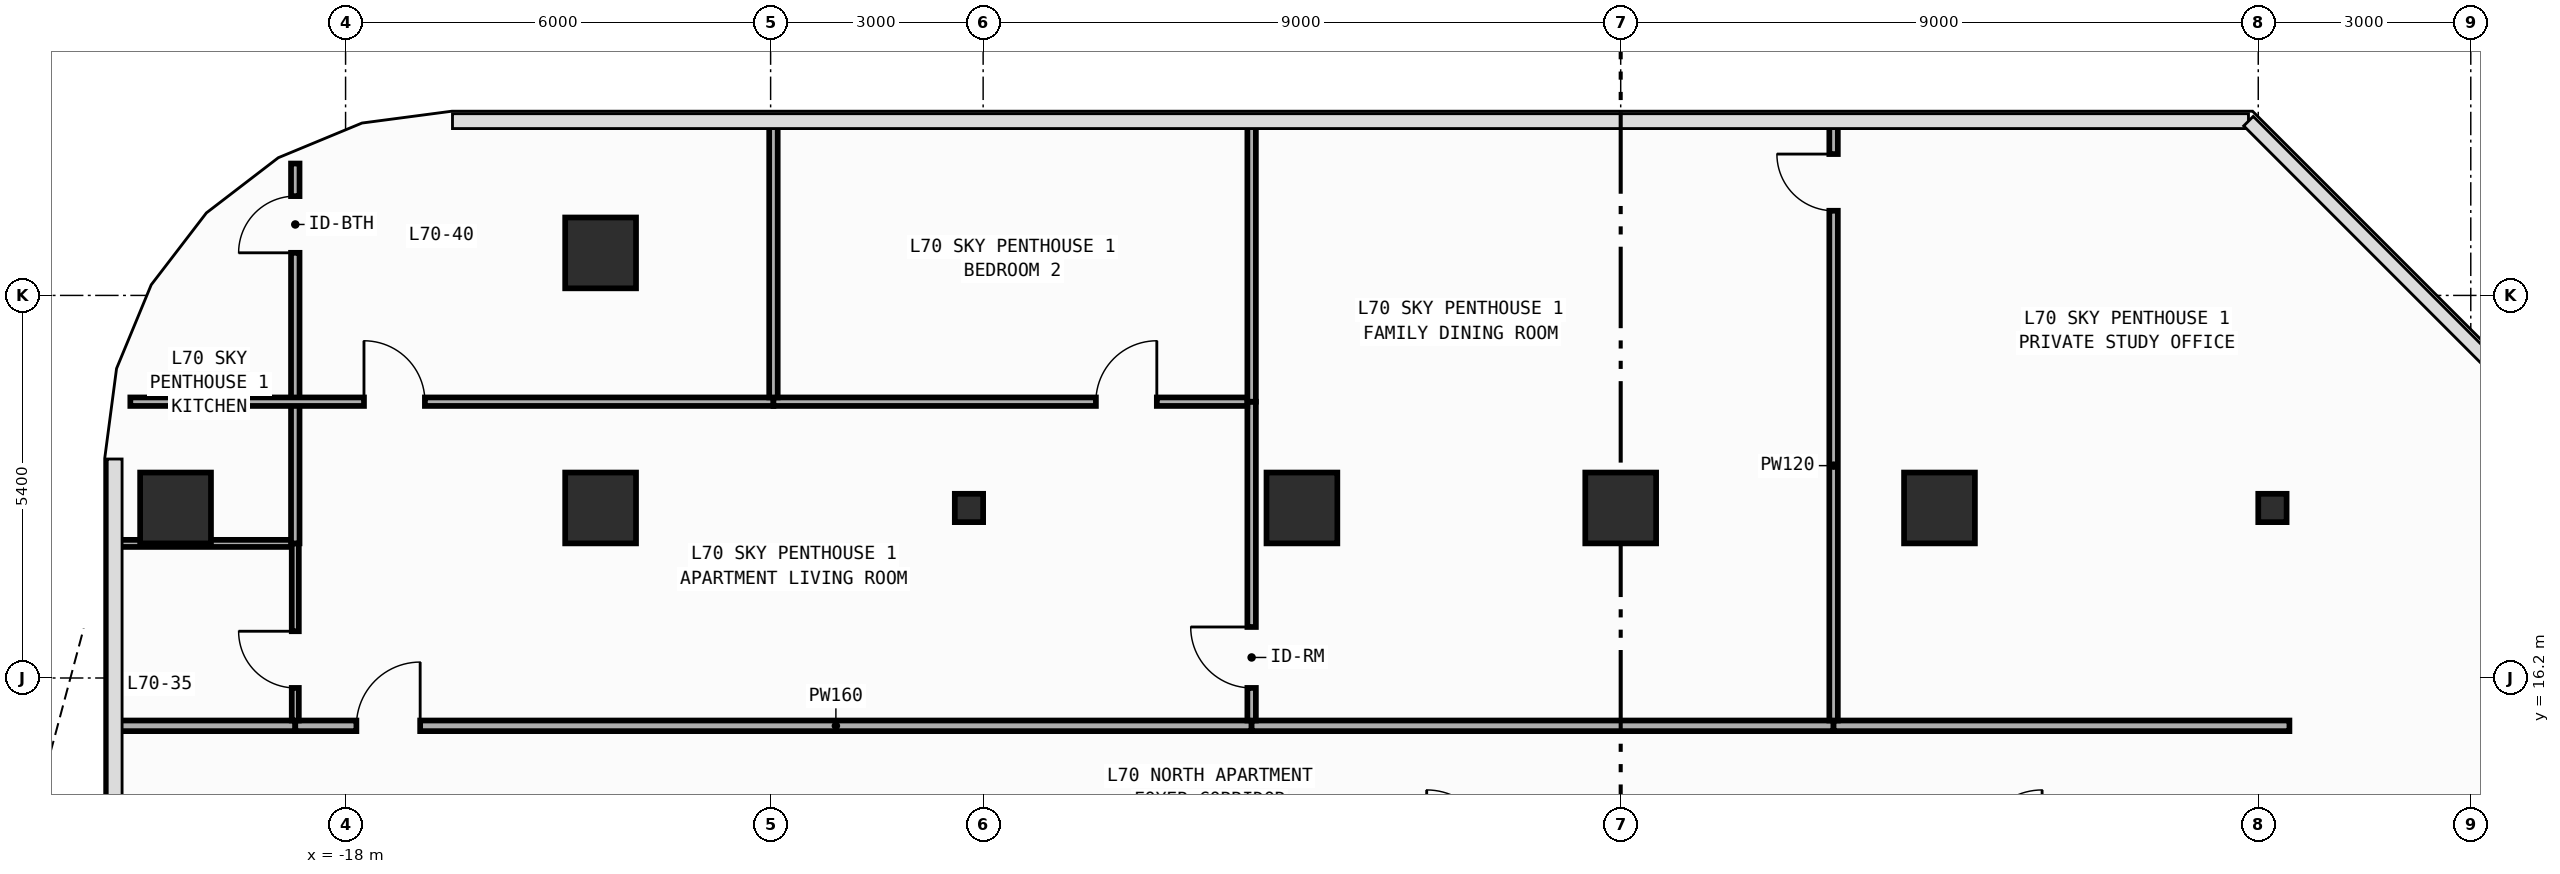
"""IFC4 building model, lengths in metres.
Left out: names, types, materials, properties, quantities, classifications, styles, units other than length and angle.
Written with IfcOpenShell. Run it as: python <this file> out.ifc"""

import sys

from ifc_helpers import new_model, si_unit, direction, frame, frame_2d, origin, origin_2d, place, context, subcontext, project, spatial, rectangle, circle, i_section, extrude, element, fill, save


model = new_model("IFC4")
c1 = context("Model", 3, precision=1e-05, world=origin(), true_north=direction((0.0, 1.0)))
c2 = subcontext(c1, "Body", "Model", "MODEL_VIEW")
j1 = project(units=[si_unit("LENGTHUNIT", "METRE"), si_unit("PLANEANGLEUNIT", "RADIAN")], contexts=[c1])
p1 = place(None, origin())
s1 = spatial("IfcSite", under=j1, at=p1, CompositionType="ELEMENT")
p2 = place(p1, origin())
s2 = spatial("IfcBuilding", under=s1, at=p2, CompositionType="ELEMENT")
p3 = place(p2, frame((0.0, 0.0, 292.8)))
s3 = spatial("IfcBuildingStorey", under=s2, at=p3, CompositionType="ELEMENT", Elevation=292.8)
for number, where, z_axis, x_axis in (
    (1, (-9.2, 18.6, 0.0), (0.0, 0.0, 1.0), (1.0, 0.0, 0.0)),
    (2, (9.2, 18.6, 0.0), (0.0, 0.0, 1.0), (1.0, 0.0, 0.0)),
):
    element("IfcColumn", number, at=place(p3, frame(where, z_axis=z_axis, x_axis=x_axis)), inside=s3, PredefinedType="COLUMN", context=c2, shape_type="SweptSolid", body=[
        extrude(i_section(OverallWidth=0.4, OverallDepth=0.4, WebThickness=0.013, FlangeThickness=0.021, FilletRadius=0.022, at=origin_2d()), origin(), (0.0, 0.0, 1.0), 3.8),
    ])
for number, where, z_axis, x_axis in (
    (3, (-20.4, 18.6, 0.0), (0.0, 0.0, 1.0), (1.0, 0.0, 0.0)),
    (4, (-14.4, 18.6, 0.0), (0.0, 0.0, 1.0), (1.0, 0.0, 0.0)),
    (5, (-4.5, 18.6, 0.0), (0.0, 0.0, 1.0), (1.0, 0.0, 0.0)),
    (6, (0.0, 18.6, 0.0), (0.0, 0.0, 1.0), (1.0, 0.0, 0.0)),
    (7, (4.5, 18.6, 0.0), (0.0, 0.0, 1.0), (1.0, 0.0, 0.0)),
    (8, (-14.4, 22.2, 0.0), (0.0, 0.0, 1.0), (1.0, 0.0, 0.0)),
):
    element("IfcColumn", number, at=place(p3, frame(where, z_axis=z_axis, x_axis=x_axis)), inside=s3, PredefinedType="COLUMN", context=c2, shape_type="SweptSolid", body=[
        extrude(circle(Radius=0.5, at=origin_2d()), origin(), (0.0, 0.0, 1.0), 3.8),
    ])
p4 = place(p3, frame((-21.255, 15.525, 0.0), z_axis=(0.0, 0.0, 1.0), x_axis=(1.0, 0.0, 0.0)))
e9 = element("IfcWall", 9, at=p4, inside=s3, PredefinedType="PARTITIONING", context=c2, shape_type="SweptSolid", body=[
    extrude(rectangle(XDim=2.545, YDim=0.15, at=frame_2d((1.272, 0.0))), origin(), (0.0, 0.0, 1.0), 3.54),
])
p5 = place(p3, frame((-18.71, 15.525, 0.0), z_axis=(0.0, 0.0, 1.0), x_axis=(1.0, 0.0, 0.0)))
e10 = element("IfcWall", 10, at=p5, inside=s3, PredefinedType="PARTITIONING", context=c2, shape_type="SweptSolid", body=[
    extrude(rectangle(XDim=13.5, YDim=0.15, at=frame_2d((6.75, 0.0))), origin(), (0.0, 0.0, 1.0), 3.54),
])
p6 = place(p5, frame((0.863, 0.0, 0.0)))
e11 = element("IfcOpeningElement", 11, at=p6, cuts=e10, PredefinedType="OPENING", context=c2, shape_type="SweptSolid", body=[
    extrude(rectangle(XDim=0.9, YDim=2.15, at=frame_2d((0.45, 1.075))), frame((0.0, 0.085, 0.0), z_axis=(0.0, -1.0, 0.0), x_axis=(1.0, 0.0, 0.0)), (0.0, 0.0, 1.0), 0.17),
])
p7 = place(p3, frame((-5.21, 15.525, 0.0), z_axis=(0.0, 0.0, 1.0), x_axis=(1.0, 0.0, 0.0)))
e12 = element("IfcWall", 12, at=p7, inside=s3, PredefinedType="PARTITIONING", context=c2, shape_type="SweptSolid", body=[
    extrude(rectangle(XDim=8.215, YDim=0.15, at=frame_2d((4.107, 0.0))), origin(), (0.0, 0.0, 1.0), 3.54),
])
p8 = place(p3, frame((3.005, 15.525, 0.0), z_axis=(0.0, 0.0, 1.0), x_axis=(1.0, 0.0, 0.0)))
e13 = element("IfcWall", 13, at=p8, inside=s3, PredefinedType="PARTITIONING", context=c2, shape_type="SweptSolid", body=[
    extrude(rectangle(XDim=6.435, YDim=0.15, at=frame_2d((3.218, 0.0))), origin(), (0.0, 0.0, 1.0), 3.54),
])
p9 = place(p3, frame((-21.255, 18.1, 0.0), z_axis=(0.0, 0.0, 1.0), x_axis=(1.0, 0.0, 0.0)))
e14 = element("IfcWall", 14, at=p9, inside=s3, PredefinedType="PARTITIONING", context=c2, shape_type="SweptSolid", body=[
    extrude(rectangle(XDim=2.495, YDim=0.1, at=frame_2d((1.248, 0.0))), origin(), (0.0, 0.0, 1.0), 3.54),
])
p10 = place(p3, frame((-18.71, 15.6, 0.0), z_axis=(0.0, 0.0, 1.0), x_axis=(0.0, 1.0, 0.0)))
e15 = element("IfcWall", 15, at=p10, inside=s3, PredefinedType="PARTITIONING", context=c2, shape_type="SweptSolid", body=[
    extrude(rectangle(XDim=2.5, YDim=0.1, at=frame_2d((1.25, 0.0))), origin(), (0.0, 0.0, 1.0), 3.54),
])
p11 = place(p10, frame((0.46, 0.0, 0.0)))
e16 = element("IfcOpeningElement", 16, at=p11, cuts=e15, PredefinedType="OPENING", context=c2, shape_type="SweptSolid", body=[
    extrude(rectangle(XDim=0.8, YDim=2.1, at=frame_2d((0.4, 1.05))), frame((0.0, 0.06, 0.0), z_axis=(0.0, -1.0, 0.0), x_axis=(1.0, 0.0, 0.0)), (0.0, 0.0, 1.0), 0.12),
])
p12 = place(p3, frame((-18.71, 18.1, 0.0), z_axis=(0.0, 0.0, 1.0), x_axis=(0.0, 1.0, 0.0)))
e17 = element("IfcWall", 17, at=p12, inside=s3, PredefinedType="PARTITIONING", context=c2, shape_type="SweptSolid", body=[
    extrude(rectangle(XDim=2.0, YDim=0.12, at=frame_2d((1.0, 0.0))), origin(), (0.0, 0.0, 1.0), 3.54),
])
p13 = place(p3, frame((-18.71, 20.1, 0.0), z_axis=(0.0, 0.0, 1.0), x_axis=(0.0, 1.0, 0.0)))
e18 = element("IfcWall", 18, at=p13, inside=s3, PredefinedType="PARTITIONING", context=c2, shape_type="SweptSolid", body=[
    extrude(rectangle(XDim=3.361, YDim=0.12, at=frame_2d((1.681, 0.0))), origin(), (0.0, 0.0, 1.0), 3.54),
])
p14 = place(p13, frame((2.102, 0.0, 0.0)))
e19 = element("IfcOpeningElement", 19, at=p14, cuts=e18, PredefinedType="OPENING", context=c2, shape_type="SweptSolid", body=[
    extrude(rectangle(XDim=0.8, YDim=2.1, at=frame_2d((0.4, 1.05))), frame((0.0, 0.07, 0.0), z_axis=(0.0, -1.0, 0.0), x_axis=(1.0, 0.0, 0.0)), (0.0, 0.0, 1.0), 0.14),
])
p15 = place(p3, frame((-5.21, 15.6, 0.0), z_axis=(0.0, 0.0, 1.0), x_axis=(0.0, 1.0, 0.0)))
e20 = element("IfcWall", 20, at=p15, inside=s3, PredefinedType="PARTITIONING", context=c2, shape_type="SweptSolid", body=[
    extrude(rectangle(XDim=4.5, YDim=0.12, at=frame_2d((2.25, 0.0))), origin(), (0.0, 0.0, 1.0), 3.54),
])
p16 = place(p15, frame((0.46, 0.0, 0.0)))
e21 = element("IfcOpeningElement", 21, at=p16, cuts=e20, PredefinedType="OPENING", context=c2, shape_type="SweptSolid", body=[
    extrude(rectangle(XDim=0.86, YDim=2.15, at=frame_2d((0.43, 1.075))), frame((0.0, 0.07, 0.0), z_axis=(0.0, -1.0, 0.0), x_axis=(1.0, 0.0, 0.0)), (0.0, 0.0, 1.0), 0.14),
])
p17 = place(p3, frame((-21.039, 20.1, 0.0), z_axis=(0.0, 0.0, 1.0), x_axis=(1.0, 0.0, 0.0)))
e22 = element("IfcWall", 22, at=p17, inside=s3, PredefinedType="PARTITIONING", context=c2, shape_type="SweptSolid", body=[
    extrude(rectangle(XDim=9.079, YDim=0.12, at=frame_2d((4.539, 0.0))), origin(), (0.0, 0.0, 1.0), 3.54),
])
p18 = place(p17, frame((3.298, 0.0, 0.0)))
e23 = element("IfcOpeningElement", 23, at=p18, cuts=e22, PredefinedType="OPENING", context=c2, shape_type="SweptSolid", body=[
    extrude(rectangle(XDim=0.86, YDim=2.15, at=frame_2d((0.43, 1.075))), frame((0.0, 0.07, 0.0), z_axis=(0.0, -1.0, 0.0), x_axis=(1.0, 0.0, 0.0)), (0.0, 0.0, 1.0), 0.14),
])
p19 = place(p3, frame((-11.96, 20.1, 0.0), z_axis=(0.0, 0.0, 1.0), x_axis=(1.0, 0.0, 0.0)))
e24 = element("IfcWall", 24, at=p19, inside=s3, PredefinedType="PARTITIONING", context=c2, shape_type="SweptSolid", body=[
    extrude(rectangle(XDim=6.69, YDim=0.12, at=frame_2d((3.345, 0.0))), origin(), (0.0, 0.0, 1.0), 3.54),
])
p20 = place(p19, frame((4.552, 0.0, 0.0)))
e25 = element("IfcOpeningElement", 25, at=p20, cuts=e24, PredefinedType="OPENING", context=c2, shape_type="SweptSolid", body=[
    extrude(rectangle(XDim=0.86, YDim=2.15, at=frame_2d((0.43, 1.075))), frame((0.0, 0.07, 0.0), z_axis=(0.0, -1.0, 0.0), x_axis=(1.0, 0.0, 0.0)), (0.0, 0.0, 1.0), 0.14),
])
p21 = place(p3, frame((3.005, 15.6, 0.0), z_axis=(0.0, 0.0, 1.0), x_axis=(0.0, 1.0, 0.0)))
e26 = element("IfcWall", 26, at=p21, inside=s3, PredefinedType="PARTITIONING", context=c2, shape_type="SweptSolid", body=[
    extrude(rectangle(XDim=8.455, YDim=0.12, at=frame_2d((4.228, 0.0))), origin(), (0.0, 0.0, 1.0), 3.54),
])
p22 = place(p21, frame((7.195, 0.0, 0.0)))
e27 = element("IfcOpeningElement", 27, at=p22, cuts=e26, PredefinedType="OPENING", context=c2, shape_type="SweptSolid", body=[
    extrude(rectangle(XDim=0.8, YDim=2.1, at=frame_2d((0.4, 1.05))), frame((0.0, 0.07, 0.0), z_axis=(0.0, -1.0, 0.0), x_axis=(1.0, 0.0, 0.0)), (0.0, 0.0, 1.0), 0.14),
])
p23 = place(p3, frame((-5.21, 20.1, 0.0), z_axis=(0.0, 0.0, 1.0), x_axis=(0.0, 1.0, 0.0)))
e28 = element("IfcWall", 28, at=p23, inside=s3, PredefinedType="PARTITIONING", context=c2, shape_type="SweptSolid", body=[
    extrude(rectangle(XDim=3.955, YDim=0.12, at=frame_2d((1.978, 0.0))), origin(), (0.0, 0.0, 1.0), 3.54),
])
p24 = place(p3, frame((-11.96, 20.16, 0.0), z_axis=(0.0, 0.0, 1.0), x_axis=(0.0, 1.0, 0.0)))
e29 = element("IfcWall", 29, at=p24, inside=s3, PredefinedType="PARTITIONING", context=c2, shape_type="SweptSolid", body=[
    extrude(rectangle(XDim=3.895, YDim=0.12, at=frame_2d((1.948, 0.0))), origin(), (0.0, 0.0, 1.0), 3.54),
])
p25 = place(p6, origin())
e30 = element("IfcDoor", 30, at=p25, inside=s3, OperationType="SINGLE_SWING_RIGHT", PredefinedType="DOOR", context=c2, shape_type="SweptSolid", body=[
    extrude(rectangle(XDim=0.9, YDim=2.15, at=frame_2d((0.45, 1.075))), frame((0.0, 0.025, 0.0), z_axis=(0.0, -1.0, 0.0), x_axis=(1.0, 0.0, 0.0)), (0.0, 0.0, 1.0), 0.05),
])
fill(e11, e30)
p26 = place(p11, origin())
e31 = element("IfcDoor", 31, at=p26, inside=s3, OperationType="SINGLE_SWING_RIGHT", PredefinedType="DOOR", context=c2, shape_type="SweptSolid", body=[
    extrude(rectangle(XDim=0.8, YDim=2.1, at=frame_2d((0.4, 1.05))), frame((0.0, 0.025, 0.0), z_axis=(0.0, -1.0, 0.0), x_axis=(1.0, 0.0, 0.0)), (0.0, 0.0, 1.0), 0.05),
])
fill(e16, e31)
p27 = place(p16, origin())
e32 = element("IfcDoor", 32, at=p27, inside=s3, OperationType="SINGLE_SWING_RIGHT", PredefinedType="DOOR", context=c2, shape_type="SweptSolid", body=[
    extrude(rectangle(XDim=0.86, YDim=2.15, at=frame_2d((0.43, 1.075))), frame((0.0, 0.025, 0.0), z_axis=(0.0, -1.0, 0.0), x_axis=(1.0, 0.0, 0.0)), (0.0, 0.0, 1.0), 0.05),
])
fill(e21, e32)
p28 = place(p18, origin())
e33 = element("IfcDoor", 33, at=p28, inside=s3, OperationType="SINGLE_SWING_LEFT", PredefinedType="DOOR", context=c2, shape_type="SweptSolid", body=[
    extrude(rectangle(XDim=0.86, YDim=2.15, at=frame_2d((0.43, 1.075))), frame((0.0, 0.025, 0.0), z_axis=(0.0, -1.0, 0.0), x_axis=(1.0, 0.0, 0.0)), (0.0, 0.0, 1.0), 0.05),
])
fill(e23, e33)
p29 = place(p20, origin())
e34 = element("IfcDoor", 34, at=p29, inside=s3, OperationType="SINGLE_SWING_RIGHT", PredefinedType="DOOR", context=c2, shape_type="SweptSolid", body=[
    extrude(rectangle(XDim=0.86, YDim=2.15, at=frame_2d((0.43, 1.075))), frame((0.0, 0.025, 0.0), z_axis=(0.0, -1.0, 0.0), x_axis=(1.0, 0.0, 0.0)), (0.0, 0.0, 1.0), 0.05),
])
fill(e25, e34)
p30 = place(p22, origin())
e35 = element("IfcDoor", 35, at=p30, inside=s3, OperationType="SINGLE_SWING_RIGHT", PredefinedType="DOOR", context=c2, shape_type="SweptSolid", body=[
    extrude(rectangle(XDim=0.8, YDim=2.1, at=frame_2d((0.4, 1.05))), frame((0.0, 0.025, 0.0), z_axis=(0.0, -1.0, 0.0), x_axis=(1.0, 0.0, 0.0)), (0.0, 0.0, 1.0), 0.05),
])
fill(e27, e35)
p31 = place(p14, origin())
e36 = element("IfcDoor", 36, at=p31, inside=s3, OperationType="SINGLE_SWING_LEFT", PredefinedType="DOOR", context=c2, shape_type="SweptSolid", body=[
    extrude(rectangle(XDim=0.8, YDim=2.1, at=frame_2d((0.4, 1.05))), frame((0.0, 0.025, 0.0), z_axis=(0.0, -1.0, 0.0), x_axis=(1.0, 0.0, 0.0)), (0.0, 0.0, 1.0), 0.05),
])
fill(e19, e36)
save(model, sys.argv[1])
